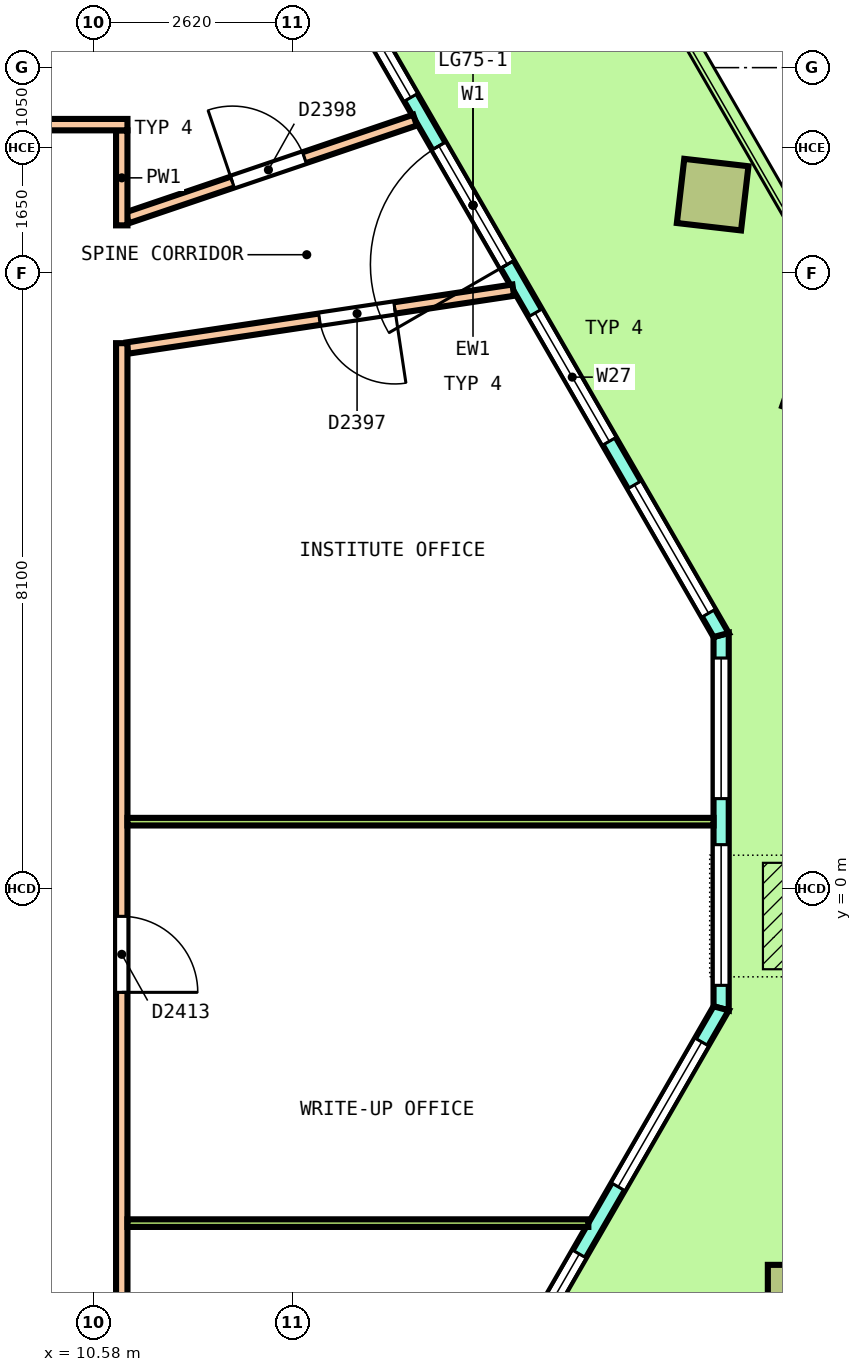
"""IFC4 building model, lengths in metres.
Left out: names, types, materials, properties, quantities, classifications, styles, units other than length and angle.
Written with IfcOpenShell. Run it as: python <this file> out.ifc"""

import sys

from ifc_helpers import new_model, si_unit, direction, frame, frame_2d, origin, origin_2d, place, context, subcontext, project, spatial, polyline, rectangle, outline, extrude, element, fill, save


model = new_model("IFC4")
c1 = context("Model", 3, precision=1e-05, world=origin(), true_north=direction((0.0, 1.0)))
c2 = subcontext(c1, "Body", "Model", "MODEL_VIEW")
j1 = project(units=[si_unit("LENGTHUNIT", "METRE"), si_unit("PLANEANGLEUNIT", "RADIAN")], contexts=[c1])
p1 = place(None, origin())
s1 = spatial("IfcSite", under=j1, at=p1, CompositionType="ELEMENT")
p2 = place(p1, origin())
s2 = spatial("IfcBuilding", under=s1, at=p2, CompositionType="ELEMENT")
p3 = place(p2, frame((0.0, 0.0, 336.6)))
s3 = spatial("IfcBuildingStorey", under=s2, at=p3, CompositionType="ELEMENT", Elevation=336.6)
p4 = place(p3, frame((20.18, 6.608, 0.0), z_axis=(0.021786848517, 0.025138671366, 0.999446537056), x_axis=(-0.499840745781, 0.866048897927, -0.010887389788)))
e1 = element("IfcColumn", 1, at=p4, inside=s3, PredefinedType="COLUMN", context=c2, shape_type="SweptSolid", body=[
    extrude(rectangle(XDim=0.85, YDim=0.85, at=origin_2d()), origin(), (0.0, 0.0, 1.0), 3.642),
])
p5 = place(p3, frame((18.724, 9.129, 0.0), z_axis=(0.025408167311, 0.018838245421, 0.999499647595), x_axis=(-0.499703712508, 0.866188822081, -0.003622734722)))
e2 = element("IfcColumn", 2, at=p5, inside=s3, PredefinedType="COLUMN", context=c2, shape_type="SweptSolid", body=[
    extrude(rectangle(XDim=0.85, YDim=0.85, at=origin_2d()), origin(), (0.0, 0.0, 1.0), 3.642),
])
p6 = place(p3, frame((19.875, -5.376, 0.0), z_axis=(0.01086334939, 0.018843217151, 0.999763432422), x_axis=(0.499615563935, 0.865974138834, -0.021750382613)))
e3 = element("IfcColumn", 3, at=p6, inside=s3, PredefinedType="COLUMN", context=c2, shape_type="SweptSolid", body=[
    extrude(rectangle(XDim=0.85, YDim=0.85, at=origin_2d()), origin(), (0.0, 0.0, 1.0), 3.641),
])
p7 = place(p3, frame((18.835, -1.576, 0.0), z_axis=(0.0, 0.0, 1.0), x_axis=(0.0, 1.0, 0.0)))
e4 = element("IfcWall", 4, at=p7, inside=s3, PredefinedType="SOLIDWALL", context=c2, shape_type="SweptSolid", body=[
    extrude(outline(polyline([(-0.027, -0.1), (1.214, -0.1), (2.456, -0.1), (3.697, -0.1), (4.938, -0.1), (4.885, 0.1), (3.67, 0.1), (2.456, 0.1), (1.241, 0.1), (0.027, 0.1), (-0.027, -0.1)])), origin(), (0.0, 0.0, 1.0), 3.7),
])
p8 = place(p7, frame((0.303, 0.0, 0.1)))
e5 = element("IfcOpeningElement", 5, at=p8, cuts=e4, PredefinedType="OPENING", context=c2, shape_type="SweptSolid", body=[
    extrude(rectangle(XDim=1.85, YDim=2.9, at=frame_2d((0.925, 1.45))), frame((0.0, 0.11, 0.0), z_axis=(0.0, -1.0, 0.0), x_axis=(1.0, 0.0, 0.0)), (0.0, 0.0, 1.0), 0.22),
])
p9 = place(p7, frame((2.759, 0.0, 0.1)))
e6 = element("IfcOpeningElement", 6, at=p9, cuts=e4, PredefinedType="OPENING", context=c2, shape_type="SweptSolid", body=[
    extrude(rectangle(XDim=1.85, YDim=2.9, at=frame_2d((0.925, 1.45))), frame((0.0, 0.11, 0.0), z_axis=(0.0, -1.0, 0.0), x_axis=(1.0, 0.0, 0.0)), (0.0, 0.0, 1.0), 0.22),
])
p10 = place(p3, frame((18.835, 3.336, 0.0), z_axis=(0.0, 0.0, 1.0), x_axis=(-0.499987877897, 0.866032402371, 0.0)))
e7 = element("IfcWall", 7, at=p10, inside=s3, PredefinedType="SOLIDWALL", context=c2, shape_type="SweptSolid", body=[
    extrude(outline(polyline([(-0.027, -0.1), (0.982, -0.1), (1.99, -0.1), (2.999, -0.1), (4.008, -0.1), (5.016, -0.1), (6.025, -0.1), (7.033, -0.1), (8.042, -0.1), (9.05, -0.1), (10.059, -0.1), (11.068, -0.1), (12.076, -0.1), (13.085, -0.1), (13.031, 0.1), (12.031, 0.1), (11.03, 0.1), (10.03, 0.1), (9.03, 0.1), (8.029, 0.1), (7.029, 0.1), (6.029, 0.1), (5.029, 0.1), (4.028, 0.1), (3.028, 0.1), (2.028, 0.1), (1.027, 0.1), (0.027, 0.1), (-0.027, -0.1)])), origin(), (0.0, 0.0, 1.0), 3.7),
])
p11 = place(p10, frame((0.331, 0.0, 0.1)))
e8 = element("IfcOpeningElement", 8, at=p11, cuts=e7, PredefinedType="OPENING", context=c2, shape_type="SweptSolid", body=[
    extrude(rectangle(XDim=1.95, YDim=2.9, at=frame_2d((0.975, 1.45))), frame((0.0, 0.11, 0.0), z_axis=(0.0, -1.0, 0.0), x_axis=(1.0, 0.0, 0.0)), (0.0, 0.0, 1.0), 0.22),
])
p12 = place(p10, frame((2.942, 0.0, 0.1)))
e9 = element("IfcOpeningElement", 9, at=p12, cuts=e7, PredefinedType="OPENING", context=c2, shape_type="SweptSolid", body=[
    extrude(rectangle(XDim=1.95, YDim=2.9, at=frame_2d((0.975, 1.45))), frame((0.0, 0.11, 0.0), z_axis=(0.0, -1.0, 0.0), x_axis=(1.0, 0.0, 0.0)), (0.0, 0.0, 1.0), 0.22),
])
p13 = place(p10, frame((5.629, 0.0, 0.0)))
e10 = element("IfcOpeningElement", 10, at=p13, cuts=e7, PredefinedType="OPENING", context=c2, shape_type="SweptSolid", body=[
    extrude(rectangle(XDim=1.8, YDim=2.4, at=frame_2d((0.9, 1.2))), frame((0.0, 0.11, 0.0), z_axis=(0.0, -1.0, 0.0), x_axis=(1.0, 0.0, 0.0)), (0.0, 0.0, 1.0), 0.22),
])
p14 = place(p10, frame((5.629, 0.0, 2.55)))
e11 = element("IfcOpeningElement", 11, at=p14, cuts=e7, PredefinedType="OPENING", context=c2, shape_type="SweptSolid", body=[
    extrude(rectangle(XDim=1.8, YDim=0.45, at=frame_2d((0.9, 0.225))), frame((0.0, 0.11, 0.0), z_axis=(0.0, -1.0, 0.0), x_axis=(1.0, 0.0, 0.0)), (0.0, 0.0, 1.0), 0.22),
])
p15 = place(p10, frame((8.166, 0.0, 0.1)))
e12 = element("IfcOpeningElement", 12, at=p15, cuts=e7, PredefinedType="OPENING", context=c2, shape_type="SweptSolid", body=[
    extrude(rectangle(XDim=1.95, YDim=2.9, at=frame_2d((0.975, 1.45))), frame((0.0, 0.11, 0.0), z_axis=(0.0, -1.0, 0.0), x_axis=(1.0, 0.0, 0.0)), (0.0, 0.0, 1.0), 0.22),
])
p16 = place(p10, frame((10.777, 0.0, 0.1)))
e13 = element("IfcOpeningElement", 13, at=p16, cuts=e7, PredefinedType="OPENING", context=c2, shape_type="SweptSolid", body=[
    extrude(rectangle(XDim=1.95, YDim=2.9, at=frame_2d((0.975, 1.45))), frame((0.0, 0.11, 0.0), z_axis=(0.0, -1.0, 0.0), x_axis=(1.0, 0.0, 0.0)), (0.0, 0.0, 1.0), 0.22),
])
p17 = place(p3, frame((10.782, -15.524, 0.0), z_axis=(0.0, 0.0, 1.0), x_axis=(0.49999800388, 0.866026556242, 0.0)))
e14 = element("IfcWall", 14, at=p17, inside=s3, PredefinedType="SOLIDWALL", context=c2, shape_type="SweptSolid", body=[
    extrude(outline(polyline([(-0.027, -0.1), (0.983, -0.1), (1.993, -0.1), (3.003, -0.1), (4.013, -0.1), (5.023, -0.1), (6.033, -0.1), (7.043, -0.1), (8.053, -0.1), (9.063, -0.1), (10.073, -0.1), (11.083, -0.1), (12.093, -0.1), (13.103, -0.1), (14.113, -0.1), (15.123, -0.1), (16.133, -0.1), (16.079, 0.1), (15.076, 0.1), (14.073, 0.1), (13.069, 0.1), (12.066, 0.1), (11.063, 0.1), (10.06, 0.1), (9.056, 0.1), (8.053, 0.1), (7.05, 0.1), (6.046, 0.1), (5.043, 0.1), (4.04, 0.1), (3.037, 0.1), (2.033, 0.1), (1.03, 0.1), (0.027, 0.1), (-0.027, -0.1)])), origin(), (0.0, 0.0, 1.0), 3.7),
])
p18 = place(p17, frame((0.51, 0.0, 0.1)))
e15 = element("IfcOpeningElement", 15, at=p18, cuts=e14, PredefinedType="OPENING", context=c2, shape_type="SweptSolid", body=[
    extrude(rectangle(XDim=2.2, YDim=2.9, at=frame_2d((1.1, 1.45))), frame((0.0, 0.11, 0.0), z_axis=(0.0, -1.0, 0.0), x_axis=(1.0, 0.0, 0.0)), (0.0, 0.0, 1.0), 0.22),
])
p19 = place(p17, frame((3.732, 0.0, 0.1)))
e16 = element("IfcOpeningElement", 16, at=p19, cuts=e14, PredefinedType="OPENING", context=c2, shape_type="SweptSolid", body=[
    extrude(rectangle(XDim=2.2, YDim=2.9, at=frame_2d((1.1, 1.45))), frame((0.0, 0.11, 0.0), z_axis=(0.0, -1.0, 0.0), x_axis=(1.0, 0.0, 0.0)), (0.0, 0.0, 1.0), 0.22),
])
p20 = place(p17, frame((7.153, 0.0, 0.0)))
e17 = element("IfcOpeningElement", 17, at=p20, cuts=e14, PredefinedType="OPENING", context=c2, shape_type="SweptSolid", body=[
    extrude(rectangle(XDim=1.8, YDim=2.4, at=frame_2d((0.9, 1.2))), frame((0.0, 0.11, 0.0), z_axis=(0.0, -1.0, 0.0), x_axis=(1.0, 0.0, 0.0)), (0.0, 0.0, 1.0), 0.22),
])
p21 = place(p17, frame((7.153, 0.0, 2.55)))
e18 = element("IfcOpeningElement", 18, at=p21, cuts=e14, PredefinedType="OPENING", context=c2, shape_type="SweptSolid", body=[
    extrude(rectangle(XDim=1.8, YDim=0.45, at=frame_2d((0.9, 0.225))), frame((0.0, 0.11, 0.0), z_axis=(0.0, -1.0, 0.0), x_axis=(1.0, 0.0, 0.0)), (0.0, 0.0, 1.0), 0.22),
])
p22 = place(p17, frame((10.174, 0.0, 0.1)))
e19 = element("IfcOpeningElement", 19, at=p22, cuts=e14, PredefinedType="OPENING", context=c2, shape_type="SweptSolid", body=[
    extrude(rectangle(XDim=2.2, YDim=2.9, at=frame_2d((1.1, 1.45))), frame((0.0, 0.11, 0.0), z_axis=(0.0, -1.0, 0.0), x_axis=(1.0, 0.0, 0.0)), (0.0, 0.0, 1.0), 0.22),
])
p23 = place(p17, frame((13.396, 0.0, 0.1)))
e20 = element("IfcOpeningElement", 20, at=p23, cuts=e14, PredefinedType="OPENING", context=c2, shape_type="SweptSolid", body=[
    extrude(rectangle(XDim=2.2, YDim=2.9, at=frame_2d((1.1, 1.45))), frame((0.0, 0.11, 0.0), z_axis=(0.0, -1.0, 0.0), x_axis=(1.0, 0.0, 0.0)), (0.0, 0.0, 1.0), 0.22),
])
p24 = place(p3, frame((11.024, 7.111, 0.0), z_axis=(0.0, 0.0, 1.0), x_axis=(0.988936004007, 0.148342778651, 0.0)))
e21 = element("IfcWall", 21, at=p24, inside=s3, PredefinedType="PARTITIONING", context=c2, shape_type="SweptSolid", body=[
    extrude(rectangle(XDim=5.133, YDim=0.15, at=frame_2d((2.567, 0.0))), origin(), (0.0, 0.0, 1.0), 3.05),
])
p25 = place(p24, frame((2.555, 0.0, 0.0)))
e22 = element("IfcOpeningElement", 22, at=p25, cuts=e21, PredefinedType="OPENING", context=c2, shape_type="SweptSolid", body=[
    extrude(rectangle(XDim=1.0, YDim=2.1, at=frame_2d((0.5, 1.05))), frame((0.0, 0.085, 0.0), z_axis=(0.0, -1.0, 0.0), x_axis=(1.0, 0.0, 0.0)), (0.0, 0.0, 1.0), 0.17),
])
p26 = place(p3, frame((11.021, 8.824, 0.0), z_axis=(0.0, 0.0, 1.0), x_axis=(0.946948189556, 0.321386257167, 0.0)))
e23 = element("IfcWall", 23, at=p26, inside=s3, PredefinedType="PARTITIONING", context=c2, shape_type="SweptSolid", body=[
    extrude(rectangle(XDim=4.0, YDim=0.15, at=frame_2d((2.0, 0.0))), origin(), (0.0, 0.0, 1.0), 3.05),
])
p27 = place(p26, frame((1.463, 0.0, 0.0)))
e24 = element("IfcOpeningElement", 24, at=p27, cuts=e23, PredefinedType="OPENING", context=c2, shape_type="SweptSolid", body=[
    extrude(rectangle(XDim=1.0, YDim=2.1, at=frame_2d((0.5, 1.05))), frame((0.0, 0.085, 0.0), z_axis=(0.0, -1.0, 0.0), x_axis=(1.0, 0.0, 0.0)), (0.0, 0.0, 1.0), 0.17),
])
p28 = place(p3, frame((10.95, -9.975, 0.0), z_axis=(0.0, 0.0, 1.0), x_axis=(0.0, 1.0, 0.0)))
e25 = element("IfcWall", 25, at=p28, inside=s3, PredefinedType="PARTITIONING", context=c2, shape_type="SweptSolid", body=[
    extrude(rectangle(XDim=17.15, YDim=0.15, at=frame_2d((8.575, 0.0))), origin(), (0.0, 0.0, 1.0), 3.05),
])
p29 = place(p28, frame((0.875, 0.0, 0.0)))
e26 = element("IfcOpeningElement", 26, at=p29, cuts=e25, PredefinedType="OPENING", context=c2, shape_type="SweptSolid", body=[
    extrude(rectangle(XDim=1.0, YDim=2.1, at=frame_2d((0.5, 1.05))), frame((0.0, 0.085, 0.0), z_axis=(0.0, -1.0, 0.0), x_axis=(1.0, 0.0, 0.0)), (0.0, 0.0, 1.0), 0.17),
])
p30 = place(p28, frame((8.61, 0.0, 0.0)))
e27 = element("IfcOpeningElement", 27, at=p30, cuts=e25, PredefinedType="OPENING", context=c2, shape_type="SweptSolid", body=[
    extrude(rectangle(XDim=1.0, YDim=2.1, at=frame_2d((0.5, 1.05))), frame((0.0, 0.085, 0.0), z_axis=(0.0, -1.0, 0.0), x_axis=(1.0, 0.0, 0.0)), (0.0, 0.0, 1.0), 0.17),
])
p31 = place(p3, frame((10.95, 8.725, 0.0), z_axis=(0.0, 0.0, 1.0), x_axis=(0.0, 1.0, 0.0)))
e28 = element("IfcWall", 28, at=p31, inside=s3, PredefinedType="PARTITIONING", context=c2, shape_type="SweptSolid", body=[
    extrude(rectangle(XDim=1.25, YDim=0.15, at=frame_2d((0.625, 0.0))), origin(), (0.0, 0.0, 1.0), 3.05),
])
p32 = place(p3, frame((-10.875, 10.05, 0.0), z_axis=(0.0, 0.0, 1.0), x_axis=(1.0, 0.0, 0.0)))
e29 = element("IfcWall", 29, at=p32, inside=s3, PredefinedType="PARTITIONING", context=c2, shape_type="SweptSolid", body=[
    extrude(rectangle(XDim=21.9, YDim=0.15, at=frame_2d((10.95, 0.0))), origin(), (0.0, 0.0, 1.0), 3.05),
])
p33 = place(p32, frame((16.456, 0.0, 0.0)))
e30 = element("IfcOpeningElement", 30, at=p33, cuts=e29, PredefinedType="OPENING", context=c2, shape_type="SweptSolid", body=[
    extrude(rectangle(XDim=1.0, YDim=2.1, at=frame_2d((0.5, 1.05))), frame((0.0, 0.085, 0.0), z_axis=(0.0, -1.0, 0.0), x_axis=(1.0, 0.0, 0.0)), (0.0, 0.0, 1.0), 0.17),
])
p34 = place(p32, frame((13.837, 0.0, 0.0)))
e31 = element("IfcOpeningElement", 31, at=p34, cuts=e29, PredefinedType="OPENING", context=c2, shape_type="SweptSolid", body=[
    extrude(rectangle(XDim=1.0, YDim=2.1, at=frame_2d((0.5, 1.05))), frame((0.0, 0.085, 0.0), z_axis=(0.0, -1.0, 0.0), x_axis=(1.0, 0.0, 0.0)), (0.0, 0.0, 1.0), 0.17),
])
p35 = place(p32, frame((10.375, 0.0, 0.0)))
e32 = element("IfcOpeningElement", 32, at=p35, cuts=e29, PredefinedType="OPENING", context=c2, shape_type="SweptSolid", body=[
    extrude(rectangle(XDim=1.0, YDim=2.1, at=frame_2d((0.5, 1.05))), frame((0.0, 0.085, 0.0), z_axis=(0.0, -1.0, 0.0), x_axis=(1.0, 0.0, 0.0)), (0.0, 0.0, 1.0), 0.17),
])
p36 = place(p32, frame((6.112, 0.0, 0.0)))
e33 = element("IfcOpeningElement", 33, at=p36, cuts=e29, PredefinedType="OPENING", context=c2, shape_type="SweptSolid", body=[
    extrude(rectangle(XDim=1.2, YDim=2.1, at=frame_2d((0.6, 1.05))), frame((0.0, 0.085, 0.0), z_axis=(0.0, -1.0, 0.0), x_axis=(1.0, 0.0, 0.0)), (0.0, 0.0, 1.0), 0.17),
])
p37 = place(p32, frame((1.22, 0.0, 0.0)))
e34 = element("IfcOpeningElement", 34, at=p37, cuts=e29, PredefinedType="OPENING", context=c2, shape_type="SweptSolid", body=[
    extrude(rectangle(XDim=1.0, YDim=2.1, at=frame_2d((0.5, 1.05))), frame((0.0, 0.085, 0.0), z_axis=(0.0, -1.0, 0.0), x_axis=(1.0, 0.0, 0.0)), (0.0, 0.0, 1.0), 0.17),
])
p38 = place(p3, frame((11.025, 0.88, 0.0), z_axis=(0.0, 0.0, 1.0), x_axis=(1.0, 0.0, 0.0)))
e35 = element("IfcWall", 35, at=p38, inside=s3, PredefinedType="PARTITIONING", context=c2, shape_type="SweptSolid", body=[
    extrude(rectangle(XDim=7.711, YDim=0.1, at=frame_2d((3.855, 0.0))), origin(), (0.0, 0.0, 1.0), 3.05),
])
p39 = place(p3, frame((11.025, -4.402, 0.0), z_axis=(0.0, 0.0, 1.0), x_axis=(1.0, 0.0, 0.0)))
e36 = element("IfcWall", 36, at=p39, inside=s3, PredefinedType="PARTITIONING", context=c2, shape_type="SweptSolid", body=[
    extrude(rectangle(XDim=6.064, YDim=0.1, at=frame_2d((3.032, 0.0))), origin(), (0.0, 0.0, 1.0), 3.05),
])
p40 = place(p8, origin())
e37 = element("IfcWindow", 37, at=p40, inside=s3, PartitioningType="SINGLE_PANEL", PredefinedType="WINDOW", context=c2, shape_type="SweptSolid", body=[
    extrude(rectangle(XDim=1.85, YDim=2.9, at=frame_2d((0.925, 1.45))), frame((0.0, 0.03, 0.0), z_axis=(0.0, -1.0, 0.0), x_axis=(1.0, 0.0, 0.0)), (0.0, 0.0, 1.0), 0.06),
])
fill(e5, e37)
p41 = place(p9, origin())
e38 = element("IfcWindow", 38, at=p41, inside=s3, PartitioningType="SINGLE_PANEL", PredefinedType="WINDOW", context=c2, shape_type="SweptSolid", body=[
    extrude(rectangle(XDim=1.85, YDim=2.9, at=frame_2d((0.925, 1.45))), frame((0.0, 0.03, 0.0), z_axis=(0.0, -1.0, 0.0), x_axis=(1.0, 0.0, 0.0)), (0.0, 0.0, 1.0), 0.06),
])
fill(e6, e38)
p42 = place(p11, origin())
e39 = element("IfcWindow", 39, at=p42, inside=s3, PartitioningType="SINGLE_PANEL", PredefinedType="WINDOW", context=c2, shape_type="SweptSolid", body=[
    extrude(rectangle(XDim=1.95, YDim=2.9, at=frame_2d((0.975, 1.45))), frame((0.0, 0.03, 0.0), z_axis=(0.0, -1.0, 0.0), x_axis=(1.0, 0.0, 0.0)), (0.0, 0.0, 1.0), 0.06),
])
fill(e8, e39)
p43 = place(p12, origin())
e40 = element("IfcWindow", 40, at=p43, inside=s3, PartitioningType="SINGLE_PANEL", PredefinedType="WINDOW", context=c2, shape_type="SweptSolid", body=[
    extrude(rectangle(XDim=1.95, YDim=2.9, at=frame_2d((0.975, 1.45))), frame((0.0, 0.03, 0.0), z_axis=(0.0, -1.0, 0.0), x_axis=(1.0, 0.0, 0.0)), (0.0, 0.0, 1.0), 0.06),
])
fill(e9, e40)
p44 = place(p13, origin())
e41 = element("IfcDoor", 41, at=p44, inside=s3, OperationType="DOUBLE_DOOR_SINGLE_SWING", PredefinedType="DOOR", context=c2, shape_type="SweptSolid", body=[
    extrude(rectangle(XDim=1.8, YDim=2.4, at=frame_2d((0.9, 1.2))), frame((0.0, 0.025, 0.0), z_axis=(0.0, -1.0, 0.0), x_axis=(1.0, 0.0, 0.0)), (0.0, 0.0, 1.0), 0.05),
])
fill(e10, e41)
p45 = place(p14, origin())
e42 = element("IfcWindow", 42, at=p45, inside=s3, PartitioningType="SINGLE_PANEL", PredefinedType="WINDOW", context=c2, shape_type="SweptSolid", body=[
    extrude(rectangle(XDim=1.8, YDim=0.45, at=frame_2d((0.9, 0.225))), frame((0.0, 0.03, 0.0), z_axis=(0.0, -1.0, 0.0), x_axis=(1.0, 0.0, 0.0)), (0.0, 0.0, 1.0), 0.06),
])
fill(e11, e42)
p46 = place(p15, origin())
e43 = element("IfcWindow", 43, at=p46, inside=s3, PartitioningType="SINGLE_PANEL", PredefinedType="WINDOW", context=c2, shape_type="SweptSolid", body=[
    extrude(rectangle(XDim=1.95, YDim=2.9, at=frame_2d((0.975, 1.45))), frame((0.0, 0.03, 0.0), z_axis=(0.0, -1.0, 0.0), x_axis=(1.0, 0.0, 0.0)), (0.0, 0.0, 1.0), 0.06),
])
fill(e12, e43)
p47 = place(p22, origin())
e44 = element("IfcWindow", 44, at=p47, inside=s3, PartitioningType="SINGLE_PANEL", PredefinedType="WINDOW", context=c2, shape_type="SweptSolid", body=[
    extrude(rectangle(XDim=2.2, YDim=2.9, at=frame_2d((1.1, 1.45))), frame((0.0, 0.03, 0.0), z_axis=(0.0, -1.0, 0.0), x_axis=(1.0, 0.0, 0.0)), (0.0, 0.0, 1.0), 0.06),
])
fill(e19, e44)
p48 = place(p23, origin())
e45 = element("IfcWindow", 45, at=p48, inside=s3, PartitioningType="SINGLE_PANEL", PredefinedType="WINDOW", context=c2, shape_type="SweptSolid", body=[
    extrude(rectangle(XDim=2.2, YDim=2.9, at=frame_2d((1.1, 1.45))), frame((0.0, 0.03, 0.0), z_axis=(0.0, -1.0, 0.0), x_axis=(1.0, 0.0, 0.0)), (0.0, 0.0, 1.0), 0.06),
])
fill(e20, e45)
p49 = place(p25, origin())
e46 = element("IfcDoor", 46, at=p49, inside=s3, OperationType="SINGLE_SWING_RIGHT", PredefinedType="DOOR", context=c2, shape_type="SweptSolid", body=[
    extrude(rectangle(XDim=1.0, YDim=2.1, at=frame_2d((0.5, 1.05))), frame((0.0, 0.025, 0.0), z_axis=(0.0, -1.0, 0.0), x_axis=(1.0, 0.0, 0.0)), (0.0, 0.0, 1.0), 0.05),
])
fill(e22, e46)
p50 = place(p27, origin())
e47 = element("IfcDoor", 47, at=p50, inside=s3, OperationType="SINGLE_SWING_LEFT", PredefinedType="DOOR", context=c2, shape_type="SweptSolid", body=[
    extrude(rectangle(XDim=1.0, YDim=2.1, at=frame_2d((0.5, 1.05))), frame((0.0, 0.025, 0.0), z_axis=(0.0, -1.0, 0.0), x_axis=(1.0, 0.0, 0.0)), (0.0, 0.0, 1.0), 0.05),
])
fill(e24, e47)
p51 = place(p30, origin())
e48 = element("IfcDoor", 48, at=p51, inside=s3, OperationType="SINGLE_SWING_RIGHT", PredefinedType="DOOR", context=c2, shape_type="SweptSolid", body=[
    extrude(rectangle(XDim=1.0, YDim=2.1, at=frame_2d((0.5, 1.05))), frame((0.0, 0.025, 0.0), z_axis=(0.0, -1.0, 0.0), x_axis=(1.0, 0.0, 0.0)), (0.0, 0.0, 1.0), 0.05),
])
fill(e27, e48)
save(model, sys.argv[1])
